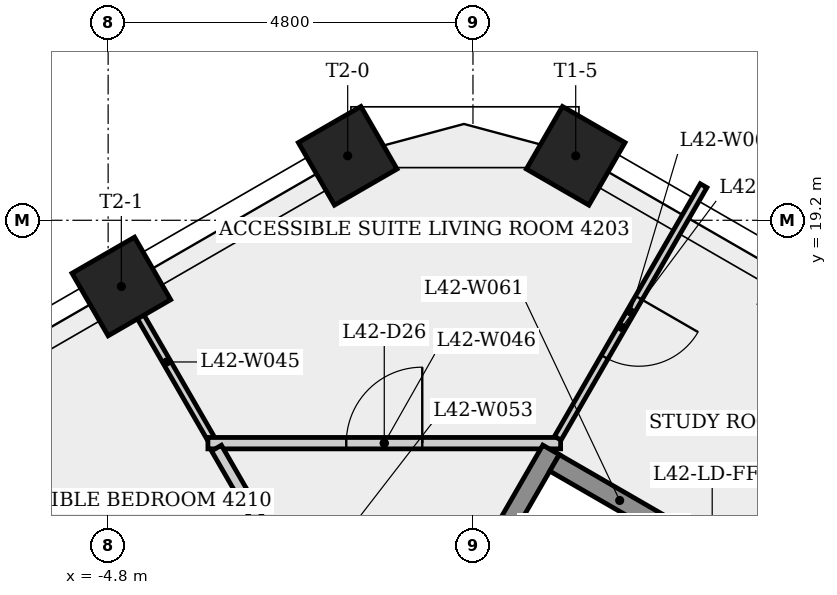
"""IFC4 building model, lengths in metres.
Left out: names, types, materials, properties, quantities, classifications, styles, units other than length and angle.
Written with IfcOpenShell. Run it as: python <this file> out.ifc"""

import sys

from ifc_helpers import new_model, si_unit, direction, frame, frame_2d, origin, origin_2d, place, context, subcontext, project, spatial, rectangle, extrude, element, fill, save


model = new_model("IFC4")
c1 = context("Model", 3, precision=1e-05, world=origin(), true_north=direction((0.0, 1.0)))
c2 = subcontext(c1, "Body", "Model", "MODEL_VIEW")
j1 = project(units=[si_unit("LENGTHUNIT", "METRE"), si_unit("PLANEANGLEUNIT", "RADIAN")], contexts=[c1])
p1 = place(None, origin())
s1 = spatial("IfcSite", under=j1, at=p1, CompositionType="ELEMENT")
p2 = place(p1, origin())
s2 = spatial("IfcBuilding", under=s1, at=p2, CompositionType="ELEMENT")
p3 = place(p2, frame((0.0, 0.0, 159.5)))
s3 = spatial("IfcBuildingStorey", under=s2, at=p3, CompositionType="ELEMENT", Elevation=159.5)
for number, where, z_axis, x_axis in (
    (1, (1.352, 20.048, 0.0), (0.0, 0.0, 1.0), (0.5, 0.866, 0.0)),
    (2, (-1.648, 20.048, 0.0), (0.0, 0.0, 1.0), (-0.5, 0.866, 0.0)),
    (3, (-4.626, 18.329, 0.0), (0.0, 0.0, 1.0), (-0.5, 0.866, 0.0)),
):
    element("IfcColumn", number, at=place(p3, frame(where, z_axis=z_axis, x_axis=x_axis)), inside=s3, PredefinedType="COLUMN", context=c2, shape_type="SweptSolid", body=[
        extrude(rectangle(XDim=0.95, YDim=0.95, at=origin_2d()), origin(), (0.0, 0.0, 1.0), 3.4),
    ])
p4 = place(p3, frame((-7.598, 16.613, 0.0), z_axis=(0.0, 0.0, 1.0), x_axis=(0.500011399757, -0.866018822032, 0.0)))
e4 = element("IfcWall", 4, at=p4, inside=s3, PredefinedType="PARTITIONING", context=c2, shape_type="SweptSolid", body=[
    extrude(rectangle(XDim=7.411, YDim=0.1, at=frame_2d((3.706, 0.0))), origin(), (0.0, 0.0, 1.0), 3.05),
])
p5 = place(p3, frame((-3.45, 16.332, 0.0), z_axis=(0.0, 0.0, 1.0), x_axis=(-0.499968667644, 0.866043492773, 0.0)))
e5 = element("IfcWall", 5, at=p5, inside=s3, PredefinedType="PARTITIONING", context=c2, shape_type="SweptSolid", body=[
    extrude(rectangle(XDim=2.318, YDim=0.1, at=frame_2d((1.159, 0.0))), origin(), (0.0, 0.0, 1.0), 3.05),
])
p6 = place(p3, frame((-3.487, 16.267, 0.0), z_axis=(0.0, 0.0, 1.0), x_axis=(1.0, 0.0, 0.0)))
e6 = element("IfcWall", 6, at=p6, inside=s3, PredefinedType="PARTITIONING", context=c2, shape_type="SweptSolid", body=[
    extrude(rectangle(XDim=4.64, YDim=0.15, at=frame_2d((2.32, 0.0))), origin(), (0.0, 0.0, 1.0), 3.05),
])
p7 = place(p6, frame((1.82, 0.0, 0.0)))
e7 = element("IfcOpeningElement", 7, at=p7, cuts=e6, PredefinedType="OPENING", context=c2, shape_type="SweptSolid", body=[
    extrude(rectangle(XDim=1.0, YDim=2.1, at=frame_2d((0.5, 1.05))), frame((0.0, 0.085, 0.0), z_axis=(0.0, -1.0, 0.0), x_axis=(1.0, 0.0, 0.0)), (0.0, 0.0, 1.0), 0.17),
])
p8 = place(p3, frame((-1.167, 12.378, 0.0), z_axis=(0.0, 0.0, 1.0), x_axis=(-0.499998454624, 0.866026296006, 0.0)))
e8 = element("IfcWall", 8, at=p8, inside=s3, PredefinedType="PARTITIONING", context=c2, shape_type="SweptSolid", body=[
    extrude(rectangle(XDim=4.416, YDim=0.15, at=frame_2d((2.208, 0.0))), origin(), (0.0, 0.0, 1.0), 3.05),
])
p9 = place(p8, frame((1.758, 0.0, 0.0)))
e9 = element("IfcOpeningElement", 9, at=p9, cuts=e8, PredefinedType="OPENING", context=c2, shape_type="SweptSolid", body=[
    extrude(rectangle(XDim=0.9, YDim=2.1, at=frame_2d((0.45, 1.05))), frame((0.0, 0.085, 0.0), z_axis=(0.0, -1.0, 0.0), x_axis=(1.0, 0.0, 0.0)), (0.0, 0.0, 1.0), 0.17),
])
p10 = place(p3, frame((-0.448, 13.624, 0.0), z_axis=(0.0, 0.0, 1.0), x_axis=(0.500037662692, 0.866003658127, 0.0)))
e10 = element("IfcWall", 10, at=p10, inside=s3, PredefinedType="SHEAR", context=c2, shape_type="SweptSolid", body=[
    extrude(rectangle(XDim=2.95, YDim=0.25, at=frame_2d((1.475, 0.0))), origin(), (0.0, 0.0, 1.0), 3.05),
])
p11 = place(p3, frame((1.073, 16.008, 0.0), z_axis=(0.0, 0.0, 1.0), x_axis=(0.866040211805, -0.499974350878, 0.0)))
e11 = element("IfcWall", 11, at=p11, inside=s3, PredefinedType="SHEAR", context=c2, shape_type="SweptSolid", body=[
    extrude(rectangle(XDim=3.3, YDim=0.25, at=frame_2d((1.65, 0.0))), origin(), (0.0, 0.0, 1.0), 3.05),
])
p12 = place(p3, frame((3.034, 19.655, 0.0), z_axis=(0.0, 0.0, 1.0), x_axis=(-0.500012543355, -0.866018161754, 0.0)))
e12 = element("IfcWall", 12, at=p12, inside=s3, PredefinedType="PARTITIONING", context=c2, shape_type="SweptSolid", body=[
    extrude(rectangle(XDim=3.837, YDim=0.1, at=frame_2d((1.918, 0.0))), origin(), (0.0, 0.0, 1.0), 3.05),
])
p13 = place(p12, frame((1.704, 0.0, 0.0)))
e13 = element("IfcOpeningElement", 13, at=p13, cuts=e12, PredefinedType="OPENING", context=c2, shape_type="SweptSolid", body=[
    extrude(rectangle(XDim=0.9, YDim=2.1, at=frame_2d((0.45, 1.05))), frame((0.0, 0.06, 0.0), z_axis=(0.0, -1.0, 0.0), x_axis=(1.0, 0.0, 0.0)), (0.0, 0.0, 1.0), 0.12),
])
p14 = place(p7, origin())
e14 = element("IfcDoor", 14, at=p14, inside=s3, OperationType="SINGLE_SWING_RIGHT", PredefinedType="DOOR", context=c2, shape_type="SweptSolid", body=[
    extrude(rectangle(XDim=1.0, YDim=2.1, at=frame_2d((0.5, 1.05))), frame((0.0, 0.025, 0.0), z_axis=(0.0, -1.0, 0.0), x_axis=(1.0, 0.0, 0.0)), (0.0, 0.0, 1.0), 0.05),
])
fill(e7, e14)
p15 = place(p13, origin())
e15 = element("IfcDoor", 15, at=p15, inside=s3, OperationType="SINGLE_SWING_LEFT", PredefinedType="DOOR", context=c2, shape_type="SweptSolid", body=[
    extrude(rectangle(XDim=0.9, YDim=2.1, at=frame_2d((0.45, 1.05))), frame((0.0, 0.025, 0.0), z_axis=(0.0, -1.0, 0.0), x_axis=(1.0, 0.0, 0.0)), (0.0, 0.0, 1.0), 0.05),
])
fill(e13, e15)
save(model, sys.argv[1])
